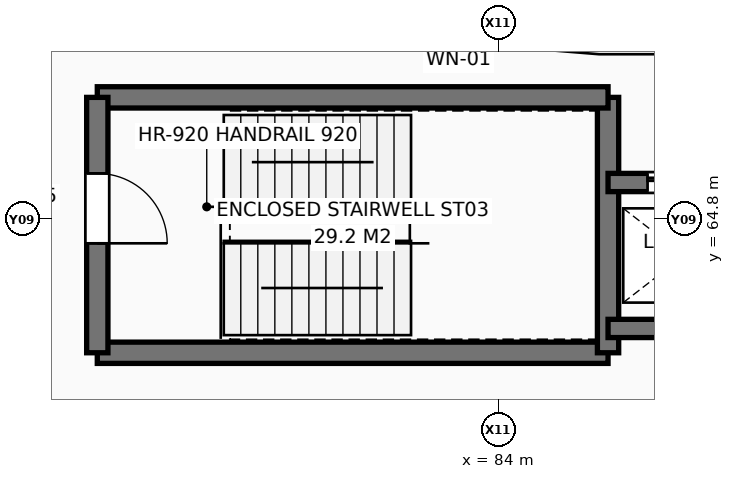
"""IFC4 building model, lengths in metres.
Left out: names, types, materials, properties, quantities, classifications, styles, units other than length and angle.
Written with IfcOpenShell. Run it as: python <this file> out.ifc"""

import sys

from ifc_helpers import new_model, si_unit, direction, frame, frame_2d, origin, place, context, subcontext, project, spatial, rectangle, extrude, element, fill, save


model = new_model("IFC4")
c1 = context("Model", 3, precision=1e-05, world=origin(), true_north=direction((0.0, 1.0)))
c2 = subcontext(c1, "Body", "Model", "MODEL_VIEW")
j1 = project(units=[si_unit("LENGTHUNIT", "METRE"), si_unit("PLANEANGLEUNIT", "RADIAN")], contexts=[c1])
p1 = place(None, origin())
s1 = spatial("IfcSite", under=j1, at=p1, CompositionType="ELEMENT")
p2 = place(p1, origin())
s2 = spatial("IfcBuilding", under=s1, at=p2, CompositionType="ELEMENT")
p3 = place(p2, frame((0.0, 0.0, 9.6)))
s3 = spatial("IfcBuildingStorey", under=s2, at=p3, CompositionType="ELEMENT", Elevation=9.6)
p4 = place(p3, frame((79.259, 68.101, 0.0), z_axis=(0.0, 0.0, 1.0), x_axis=(0.999197908265, -0.040044227027, 0.0)))
e1 = element("IfcWall", 1, at=p4, inside=s3, PredefinedType="SOLIDWALL", context=c2, shape_type="SweptSolid", body=[
    extrude(rectangle(XDim=12.925, YDim=0.34, at=frame_2d((6.462, 0.0))), origin(), (0.0, 0.0, 1.0), 3.387),
])
p5 = place(p4, frame((3.508, 0.0, 0.9)))
e2 = element("IfcOpeningElement", 2, at=p5, cuts=e1, PredefinedType="OPENING", context=c2, shape_type="SweptSolid", body=[
    extrude(rectangle(XDim=1.2, YDim=2.1, at=frame_2d((0.6, 1.05))), frame((0.0, 0.18, 0.0), z_axis=(0.0, -1.0, 0.0), x_axis=(1.0, 0.0, 0.0)), (0.0, 0.0, 1.0), 0.36),
])
p6 = place(p4, frame((8.217, 0.0, 0.9)))
e3 = element("IfcOpeningElement", 3, at=p6, cuts=e1, PredefinedType="OPENING", context=c2, shape_type="SweptSolid", body=[
    extrude(rectangle(XDim=1.2, YDim=2.1, at=frame_2d((0.6, 1.05))), frame((0.0, 0.18, 0.0), z_axis=(0.0, -1.0, 0.0), x_axis=(1.0, 0.0, 0.0)), (0.0, 0.0, 1.0), 0.36),
])
p7 = place(p3, frame((77.4, 62.6, 0.0), z_axis=(0.0, 0.0, 1.0), x_axis=(1.0, 0.0, 0.0)))
e4 = element("IfcWall", 4, at=p7, inside=s3, PredefinedType="SHEAR", context=c2, shape_type="SweptSolid", body=[
    extrude(rectangle(XDim=8.4, YDim=0.35, at=frame_2d((4.2, 0.0))), origin(), (0.0, 0.0, 1.0), 3.92),
])
p8 = place(p3, frame((85.8, 62.6, 0.0), z_axis=(0.0, 0.0, 1.0), x_axis=(0.0, 1.0, 0.0)))
e5 = element("IfcWall", 5, at=p8, inside=s3, PredefinedType="SHEAR", context=c2, shape_type="SweptSolid", body=[
    extrude(rectangle(XDim=4.2, YDim=0.35, at=frame_2d((2.1, 0.0))), origin(), (0.0, 0.0, 1.0), 3.92),
])
p9 = place(p3, frame((85.8, 66.8, 0.0), z_axis=(0.0, 0.0, 1.0), x_axis=(-1.0, 0.0, 0.0)))
e6 = element("IfcWall", 6, at=p9, inside=s3, PredefinedType="SHEAR", context=c2, shape_type="SweptSolid", body=[
    extrude(rectangle(XDim=8.4, YDim=0.35, at=frame_2d((4.2, 0.0))), origin(), (0.0, 0.0, 1.0), 3.92),
])
p10 = place(p3, frame((77.4, 66.8, 0.0), z_axis=(0.0, 0.0, 1.0), x_axis=(0.0, -1.0, 0.0)))
e7 = element("IfcWall", 7, at=p10, inside=s3, PredefinedType="SHEAR", context=c2, shape_type="SweptSolid", body=[
    extrude(rectangle(XDim=4.2, YDim=0.35, at=frame_2d((2.1, 0.0))), origin(), (0.0, 0.0, 1.0), 3.92),
])
p11 = place(p10, frame((1.25, 0.0, 0.0)))
e8 = element("IfcOpeningElement", 8, at=p11, cuts=e7, PredefinedType="OPENING", context=c2, shape_type="SweptSolid", body=[
    extrude(rectangle(XDim=1.15, YDim=2.2, at=frame_2d((0.575, 1.1))), frame((0.0, 0.185, 0.0), z_axis=(0.0, -1.0, 0.0), x_axis=(1.0, 0.0, 0.0)), (0.0, 0.0, 1.0), 0.37),
])
p12 = place(p3, frame((88.3, 65.4, 0.0), z_axis=(0.0, 0.0, 1.0), x_axis=(-1.0, 0.0, 0.0)))
e9 = element("IfcWall", 9, at=p12, inside=s3, PredefinedType="SHEAR", context=c2, shape_type="SweptSolid", body=[
    extrude(rectangle(XDim=2.5, YDim=0.3, at=frame_2d((1.25, 0.0))), origin(), (0.0, 0.0, 1.0), 3.92),
])
p13 = place(p12, frame((0.65, 0.0, 0.0)))
e10 = element("IfcOpeningElement", 10, at=p13, cuts=e9, PredefinedType="OPENING", context=c2, shape_type="SweptSolid", body=[
    extrude(rectangle(XDim=1.2, YDim=2.25, at=frame_2d((0.6, 1.125))), frame((0.0, 0.16, 0.0), z_axis=(0.0, -1.0, 0.0), x_axis=(1.0, 0.0, 0.0)), (0.0, 0.0, 1.0), 0.32),
])
p14 = place(p3, frame((85.8, 63.0, 0.0), z_axis=(0.0, 0.0, 1.0), x_axis=(1.0, 0.0, 0.0)))
e11 = element("IfcWall", 11, at=p14, inside=s3, PredefinedType="SHEAR", context=c2, shape_type="SweptSolid", body=[
    extrude(rectangle(XDim=2.5, YDim=0.3, at=frame_2d((1.25, 0.0))), origin(), (0.0, 0.0, 1.0), 3.92),
])
p15 = place(p11, origin())
e12 = element("IfcDoor", 12, at=p15, inside=s3, OperationType="SINGLE_SWING_RIGHT", PredefinedType="DOOR", context=c2, shape_type="SweptSolid", body=[
    extrude(rectangle(XDim=1.15, YDim=2.2, at=frame_2d((0.575, 1.1))), frame((0.0, 0.025, 0.0), z_axis=(0.0, -1.0, 0.0), x_axis=(1.0, 0.0, 0.0)), (0.0, 0.0, 1.0), 0.05),
])
fill(e8, e12)
p16 = place(p13, origin())
e13 = element("IfcDoor", 13, at=p16, inside=s3, OperationType="SLIDING_TO_LEFT", PredefinedType="DOOR", context=c2, shape_type="SweptSolid", body=[
    extrude(rectangle(XDim=1.2, YDim=2.25, at=frame_2d((0.6, 1.125))), frame((0.0, 0.025, 0.0), z_axis=(0.0, -1.0, 0.0), x_axis=(1.0, 0.0, 0.0)), (0.0, 0.0, 1.0), 0.05),
])
fill(e10, e13)
save(model, sys.argv[1])
